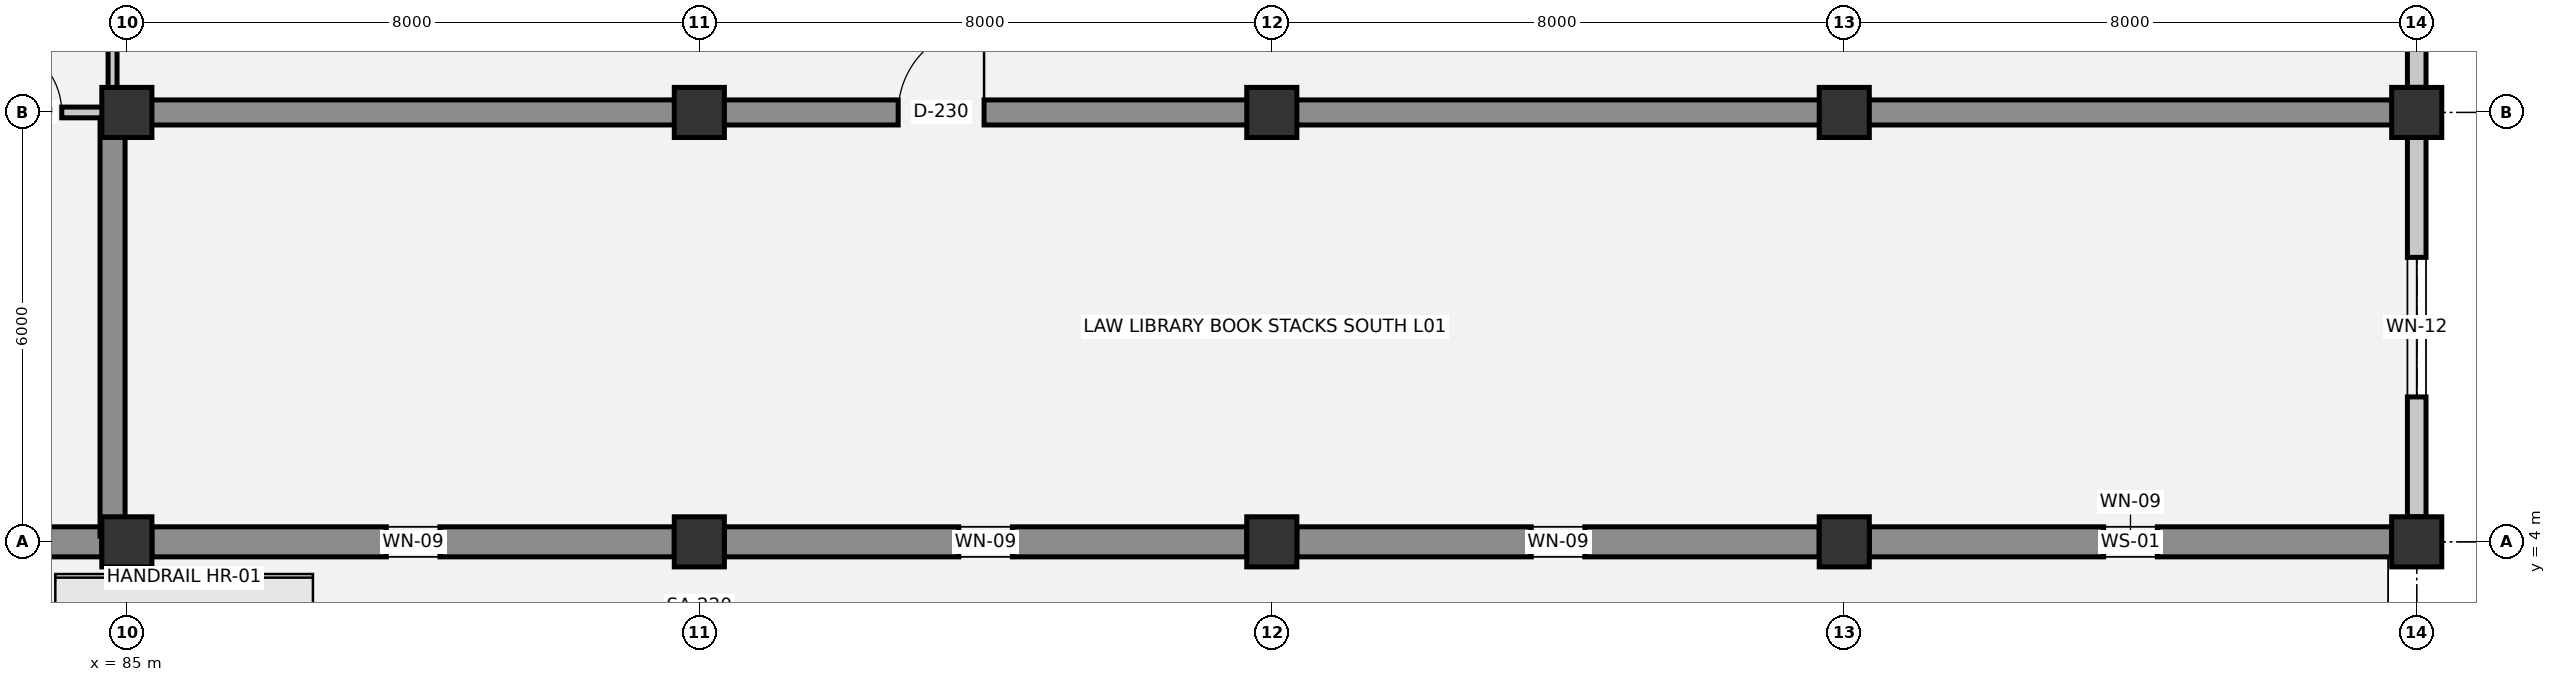
"""IFC4 building model, lengths in metres.
Left out: names, types, materials, properties, quantities, classifications, styles, units other than length and angle.
Written with IfcOpenShell. Run it as: python <this file> out.ifc"""

import sys

from ifc_helpers import new_model, si_unit, direction, frame, frame_2d, origin, origin_2d, place, context, subcontext, project, spatial, rectangle, extrude, element, fill, save


model = new_model("IFC4")
c1 = context("Model", 3, precision=1e-05, world=origin(), true_north=direction((0.0, 1.0)))
c2 = subcontext(c1, "Body", "Model", "MODEL_VIEW")
j1 = project(units=[si_unit("LENGTHUNIT", "METRE"), si_unit("PLANEANGLEUNIT", "RADIAN")], contexts=[c1])
p1 = place(None, origin())
s1 = spatial("IfcSite", under=j1, at=p1, CompositionType="ELEMENT")
p2 = place(p1, origin())
s2 = spatial("IfcBuilding", under=s1, at=p2, CompositionType="ELEMENT")
p3 = place(p2, origin())
s3 = spatial("IfcBuildingStorey", under=s2, at=p3, CompositionType="ELEMENT", Elevation=0.0)
for number, where, z_axis, x_axis in (
    (1, (85.0, 4.0, 0.0), (0.0, 0.0, 1.0), (1.0, 0.0, 0.0)),
    (2, (85.0, 10.0, 0.0), (0.0, 0.0, 1.0), (1.0, 0.0, 0.0)),
    (3, (93.0, 4.0, 0.0), (0.0, 0.0, 1.0), (1.0, 0.0, 0.0)),
    (4, (93.0, 10.0, 0.0), (0.0, 0.0, 1.0), (1.0, 0.0, 0.0)),
    (5, (101.0, 4.0, 0.0), (0.0, 0.0, 1.0), (1.0, 0.0, 0.0)),
    (6, (101.0, 10.0, 0.0), (0.0, 0.0, 1.0), (1.0, 0.0, 0.0)),
    (7, (109.0, 4.0, 0.0), (0.0, 0.0, 1.0), (1.0, 0.0, 0.0)),
    (8, (109.0, 10.0, 0.0), (0.0, 0.0, 1.0), (1.0, 0.0, 0.0)),
    (9, (117.0, 4.0, 0.0), (0.0, 0.0, 1.0), (1.0, 0.0, 0.0)),
    (10, (117.0, 10.0, 0.0), (0.0, 0.0, 1.0), (1.0, 0.0, 0.0)),
):
    element("IfcColumn", number, at=place(p3, frame(where, z_axis=z_axis, x_axis=x_axis)), inside=s3, PredefinedType="COLUMN", context=c2, shape_type="SweptSolid", body=[
        extrude(rectangle(XDim=0.7, YDim=0.7, at=origin_2d()), origin(), (0.0, 0.0, 1.0), 5.4),
    ])
p4 = place(p3, frame((117.0, 16.65, 0.0), z_axis=(0.0, 0.0, 1.0), x_axis=(0.0, -1.0, 0.0)))
e11 = element("IfcWall", 11, at=p4, inside=s3, PredefinedType="SOLIDWALL", context=c2, shape_type="SweptSolid", body=[
    extrude(rectangle(XDim=6.3, YDim=0.26, at=frame_2d((3.15, 0.0))), origin(), (0.0, 0.0, 1.0), 4.34),
])
p5 = place(p4, frame((2.05, 0.0, 0.9)))
e12 = element("IfcOpeningElement", 12, at=p5, cuts=e11, PredefinedType="OPENING", context=c2, shape_type="SweptSolid", body=[
    extrude(rectangle(XDim=2.2, YDim=1.9, at=frame_2d((1.1, 0.95))), frame((0.0, 0.14, 0.0), z_axis=(0.0, -1.0, 0.0), x_axis=(1.0, 0.0, 0.0)), (0.0, 0.0, 1.0), 0.28),
])
p6 = place(p3, frame((117.0, 9.65, 0.0), z_axis=(0.0, 0.0, 1.0), x_axis=(0.0, -1.0, 0.0)))
e13 = element("IfcWall", 13, at=p6, inside=s3, PredefinedType="SOLIDWALL", context=c2, shape_type="SweptSolid", body=[
    extrude(rectangle(XDim=5.3, YDim=0.26, at=frame_2d((2.65, 0.0))), origin(), (0.0, 0.0, 1.0), 4.34),
])
p7 = place(p6, frame((1.675, 0.0, 0.9)))
e14 = element("IfcOpeningElement", 14, at=p7, cuts=e13, PredefinedType="OPENING", context=c2, shape_type="SweptSolid", body=[
    extrude(rectangle(XDim=1.95, YDim=1.85, at=frame_2d((0.975, 0.925))), frame((0.0, 0.14, 0.0), z_axis=(0.0, -1.0, 0.0), x_axis=(1.0, 0.0, 0.0)), (0.0, 0.0, 1.0), 0.28),
])
p8 = place(p3, frame((116.65, 4.0, 0.0), z_axis=(0.0, 0.0, 1.0), x_axis=(-1.0, 0.0, 0.0)))
e15 = element("IfcWall", 15, at=p8, inside=s3, PredefinedType="SOLIDWALL", context=c2, shape_type="SweptSolid", body=[
    extrude(rectangle(XDim=7.3, YDim=0.42, at=frame_2d((3.65, 0.0))), origin(), (0.0, 0.0, 1.0), 4.34),
])
p9 = place(p8, frame((3.275, 0.0, 0.9)))
e16 = element("IfcOpeningElement", 16, at=p9, cuts=e15, PredefinedType="OPENING", context=c2, shape_type="SweptSolid", body=[
    extrude(rectangle(XDim=0.75, YDim=2.2, at=frame_2d((0.375, 1.1))), frame((0.0, 0.22, 0.0), z_axis=(0.0, -1.0, 0.0), x_axis=(1.0, 0.0, 0.0)), (0.0, 0.0, 1.0), 0.44),
])
p10 = place(p3, frame((108.65, 4.0, 0.0), z_axis=(0.0, 0.0, 1.0), x_axis=(-1.0, 0.0, 0.0)))
e17 = element("IfcWall", 17, at=p10, inside=s3, PredefinedType="SOLIDWALL", context=c2, shape_type="SweptSolid", body=[
    extrude(rectangle(XDim=7.3, YDim=0.42, at=frame_2d((3.65, 0.0))), origin(), (0.0, 0.0, 1.0), 4.34),
])
p11 = place(p10, frame((3.275, 0.0, 0.9)))
e18 = element("IfcOpeningElement", 18, at=p11, cuts=e17, PredefinedType="OPENING", context=c2, shape_type="SweptSolid", body=[
    extrude(rectangle(XDim=0.75, YDim=2.2, at=frame_2d((0.375, 1.1))), frame((0.0, 0.22, 0.0), z_axis=(0.0, -1.0, 0.0), x_axis=(1.0, 0.0, 0.0)), (0.0, 0.0, 1.0), 0.44),
])
p12 = place(p3, frame((100.65, 4.0, 0.0), z_axis=(0.0, 0.0, 1.0), x_axis=(-1.0, 0.0, 0.0)))
e19 = element("IfcWall", 19, at=p12, inside=s3, PredefinedType="SOLIDWALL", context=c2, shape_type="SweptSolid", body=[
    extrude(rectangle(XDim=7.3, YDim=0.42, at=frame_2d((3.65, 0.0))), origin(), (0.0, 0.0, 1.0), 4.34),
])
p13 = place(p12, frame((3.275, 0.0, 0.9)))
e20 = element("IfcOpeningElement", 20, at=p13, cuts=e19, PredefinedType="OPENING", context=c2, shape_type="SweptSolid", body=[
    extrude(rectangle(XDim=0.75, YDim=2.2, at=frame_2d((0.375, 1.1))), frame((0.0, 0.22, 0.0), z_axis=(0.0, -1.0, 0.0), x_axis=(1.0, 0.0, 0.0)), (0.0, 0.0, 1.0), 0.44),
])
p14 = place(p3, frame((92.65, 4.0, 0.0), z_axis=(0.0, 0.0, 1.0), x_axis=(-1.0, 0.0, 0.0)))
e21 = element("IfcWall", 21, at=p14, inside=s3, PredefinedType="SOLIDWALL", context=c2, shape_type="SweptSolid", body=[
    extrude(rectangle(XDim=7.3, YDim=0.42, at=frame_2d((3.65, 0.0))), origin(), (0.0, 0.0, 1.0), 4.34),
])
p15 = place(p14, frame((3.275, 0.0, 0.9)))
e22 = element("IfcOpeningElement", 22, at=p15, cuts=e21, PredefinedType="OPENING", context=c2, shape_type="SweptSolid", body=[
    extrude(rectangle(XDim=0.75, YDim=2.2, at=frame_2d((0.375, 1.1))), frame((0.0, 0.22, 0.0), z_axis=(0.0, -1.0, 0.0), x_axis=(1.0, 0.0, 0.0)), (0.0, 0.0, 1.0), 0.44),
])
p16 = place(p3, frame((84.65, 4.0, 0.0), z_axis=(0.0, 0.0, 1.0), x_axis=(-1.0, 0.0, 0.0)))
e23 = element("IfcWall", 23, at=p16, inside=s3, PredefinedType="SOLIDWALL", context=c2, shape_type="SweptSolid", body=[
    extrude(rectangle(XDim=7.3, YDim=0.42, at=frame_2d((3.65, 0.0))), origin(), (0.0, 0.0, 1.0), 4.34),
])
p17 = place(p16, frame((3.275, 0.0, 0.9)))
e24 = element("IfcOpeningElement", 24, at=p17, cuts=e23, PredefinedType="OPENING", context=c2, shape_type="SweptSolid", body=[
    extrude(rectangle(XDim=0.75, YDim=2.2, at=frame_2d((0.375, 1.1))), frame((0.0, 0.22, 0.0), z_axis=(0.0, -1.0, 0.0), x_axis=(1.0, 0.0, 0.0)), (0.0, 0.0, 1.0), 0.44),
])
p18 = place(p3, frame((82.48, 10.0, 0.0), z_axis=(0.0, 0.0, 1.0), x_axis=(1.0, 0.0, 0.0)))
e25 = element("IfcWall", 25, at=p18, inside=s3, PredefinedType="PARTITIONING", context=c2, shape_type="SweptSolid", body=[
    extrude(rectangle(XDim=2.24, YDim=0.15, at=frame_2d((1.12, 0.0))), origin(), (0.0, 0.0, 1.0), 4.36),
])
p19 = place(p18, frame((0.63, 0.0, 0.0)))
e26 = element("IfcOpeningElement", 26, at=p19, cuts=e25, PredefinedType="OPENING", context=c2, shape_type="SweptSolid", body=[
    extrude(rectangle(XDim=0.98, YDim=2.1, at=frame_2d((0.49, 1.05))), frame((0.0, 0.085, 0.0), z_axis=(0.0, -1.0, 0.0), x_axis=(1.0, 0.0, 0.0)), (0.0, 0.0, 1.0), 0.17),
])
p20 = place(p3, frame((84.88, 10.0, 0.0), z_axis=(0.0, 0.0, 1.0), x_axis=(1.0, 0.0, 0.0)))
e27 = element("IfcWall", 27, at=p20, inside=s3, PredefinedType="SHEAR", context=c2, shape_type="SweptSolid", body=[
    extrude(rectangle(XDim=32.04, YDim=0.35, at=frame_2d((16.02, 0.0))), origin(), (0.0, 0.0, 1.0), 5.04),
])
p21 = place(p20, frame((10.899, 0.0, 0.0)))
e28 = element("IfcOpeningElement", 28, at=p21, cuts=e27, PredefinedType="OPENING", context=c2, shape_type="SweptSolid", body=[
    extrude(rectangle(XDim=1.2, YDim=2.15, at=frame_2d((0.6, 1.075))), frame((0.0, 0.185, 0.0), z_axis=(0.0, -1.0, 0.0), x_axis=(1.0, 0.0, 0.0)), (0.0, 0.0, 1.0), 0.37),
])
p22 = place(p3, frame((84.8, 4.08, 0.0), z_axis=(0.0, 0.0, 1.0), x_axis=(0.0, 1.0, 0.0)))
e29 = element("IfcWall", 29, at=p22, inside=s3, PredefinedType="SHEAR", context=c2, shape_type="SweptSolid", body=[
    extrude(rectangle(XDim=5.84, YDim=0.35, at=frame_2d((2.92, 0.0))), origin(), (0.0, 0.0, 1.0), 5.04),
])
p23 = place(p3, frame((84.8, 10.08, 0.0), z_axis=(0.0, 0.0, 1.0), x_axis=(0.0, 1.0, 0.0)))
e30 = element("IfcWall", 30, at=p23, inside=s3, PredefinedType="PARTITIONING", context=c2, shape_type="SweptSolid", body=[
    extrude(rectangle(XDim=14.84, YDim=0.125, at=frame_2d((7.42, 0.0))), origin(), (0.0, 0.0, 1.0), 4.51),
])
p24 = place(p7, origin())
e31 = element("IfcWindow", 31, at=p24, inside=s3, PartitioningType="SINGLE_PANEL", PredefinedType="WINDOW", context=c2, shape_type="SweptSolid", body=[
    extrude(rectangle(XDim=1.95, YDim=1.85, at=frame_2d((0.975, 0.925))), frame((0.0, 0.03, 0.0), z_axis=(0.0, -1.0, 0.0), x_axis=(1.0, 0.0, 0.0)), (0.0, 0.0, 1.0), 0.06),
])
fill(e14, e31)
p25 = place(p9, origin())
e32 = element("IfcWindow", 32, at=p25, inside=s3, PartitioningType="SINGLE_PANEL", PredefinedType="WINDOW", context=c2, shape_type="SweptSolid", body=[
    extrude(rectangle(XDim=0.75, YDim=2.2, at=frame_2d((0.375, 1.1))), frame((0.0, 0.03, 0.0), z_axis=(0.0, -1.0, 0.0), x_axis=(1.0, 0.0, 0.0)), (0.0, 0.0, 1.0), 0.06),
])
fill(e16, e32)
p26 = place(p11, origin())
e33 = element("IfcWindow", 33, at=p26, inside=s3, PartitioningType="SINGLE_PANEL", PredefinedType="WINDOW", context=c2, shape_type="SweptSolid", body=[
    extrude(rectangle(XDim=0.75, YDim=2.2, at=frame_2d((0.375, 1.1))), frame((0.0, 0.03, 0.0), z_axis=(0.0, -1.0, 0.0), x_axis=(1.0, 0.0, 0.0)), (0.0, 0.0, 1.0), 0.06),
])
fill(e18, e33)
p27 = place(p13, origin())
e34 = element("IfcWindow", 34, at=p27, inside=s3, PartitioningType="SINGLE_PANEL", PredefinedType="WINDOW", context=c2, shape_type="SweptSolid", body=[
    extrude(rectangle(XDim=0.75, YDim=2.2, at=frame_2d((0.375, 1.1))), frame((0.0, 0.03, 0.0), z_axis=(0.0, -1.0, 0.0), x_axis=(1.0, 0.0, 0.0)), (0.0, 0.0, 1.0), 0.06),
])
fill(e20, e34)
p28 = place(p15, origin())
e35 = element("IfcWindow", 35, at=p28, inside=s3, PartitioningType="SINGLE_PANEL", PredefinedType="WINDOW", context=c2, shape_type="SweptSolid", body=[
    extrude(rectangle(XDim=0.75, YDim=2.2, at=frame_2d((0.375, 1.1))), frame((0.0, 0.03, 0.0), z_axis=(0.0, -1.0, 0.0), x_axis=(1.0, 0.0, 0.0)), (0.0, 0.0, 1.0), 0.06),
])
fill(e22, e35)
p29 = place(p19, origin())
e36 = element("IfcDoor", 36, at=p29, inside=s3, OperationType="SINGLE_SWING_LEFT", PredefinedType="DOOR", context=c2, shape_type="SweptSolid", body=[
    extrude(rectangle(XDim=0.98, YDim=2.1, at=frame_2d((0.49, 1.05))), frame((0.0, 0.025, 0.0), z_axis=(0.0, -1.0, 0.0), x_axis=(1.0, 0.0, 0.0)), (0.0, 0.0, 1.0), 0.05),
])
fill(e26, e36)
p30 = place(p21, origin())
e37 = element("IfcDoor", 37, at=p30, inside=s3, OperationType="SINGLE_SWING_RIGHT", PredefinedType="DOOR", context=c2, shape_type="SweptSolid", body=[
    extrude(rectangle(XDim=1.2, YDim=2.15, at=frame_2d((0.6, 1.075))), frame((0.0, 0.025, 0.0), z_axis=(0.0, -1.0, 0.0), x_axis=(1.0, 0.0, 0.0)), (0.0, 0.0, 1.0), 0.05),
])
fill(e28, e37)
save(model, sys.argv[1])
